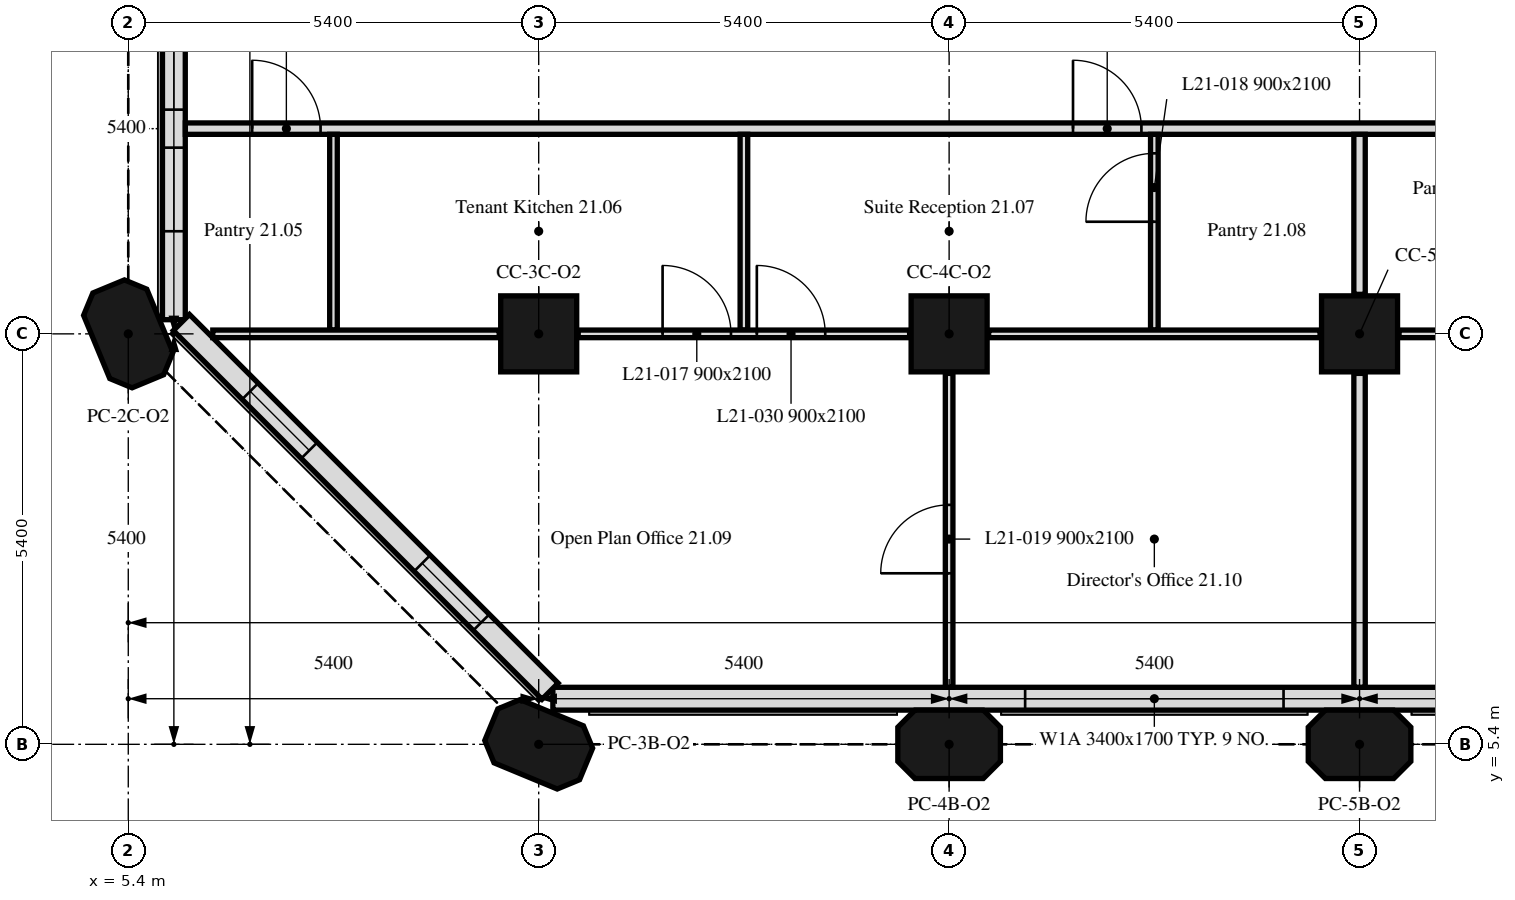
"""IFC4 building model, lengths in metres.
Left out: names, types, materials, properties, quantities, classifications, styles, units other than length and angle.
Written with IfcOpenShell. Run it as: python <this file> out.ifc"""

import sys

from ifc_helpers import new_model, si_unit, direction, frame, frame_2d, origin, origin_2d, place, context, subcontext, project, spatial, polyline, rectangle, outline, extrude, element, fill, save


model = new_model("IFC4")
c1 = context("Model", 3, precision=1e-05, world=origin(), true_north=direction((0.0, 1.0)))
c2 = subcontext(c1, "Body", "Model", "MODEL_VIEW")
j1 = project(units=[si_unit("LENGTHUNIT", "METRE"), si_unit("PLANEANGLEUNIT", "RADIAN")], contexts=[c1])
p1 = place(None, origin())
s1 = spatial("IfcSite", under=j1, at=p1, CompositionType="ELEMENT")
p2 = place(p1, origin())
s2 = spatial("IfcBuilding", under=s1, at=p2, CompositionType="ELEMENT")
p3 = place(p2, frame((0.0, 0.0, 91.6)))
s3 = spatial("IfcBuildingStorey", under=s2, at=p3, CompositionType="ELEMENT", Elevation=91.6)
for number, where, z_axis, x_axis in (
    (1, (10.8, 5.4, 0.0), (0.0, 0.0, 1.0), (-0.924, 0.383, 0.0)),
    (2, (16.2, 5.4, 0.0), (0.0, 0.0, 1.0), (1.0, 0.0, 0.0)),
    (3, (21.6, 5.4, 0.0), (0.0, 0.0, 1.0), (1.0, 0.0, 0.0)),
    (4, (5.4, 10.8, 0.0), (0.0, 0.0, 1.0), (-0.383, 0.924, 0.0)),
):
    element("IfcColumn", number, at=place(p3, frame(where, z_axis=z_axis, x_axis=x_axis)), inside=s3, PredefinedType="COLUMN", context=c2, shape_type="SweptSolid", body=[
        extrude(outline(polyline([(-0.45, -0.45), (0.45, -0.45), (0.675, -0.225), (0.675, 0.225), (0.45, 0.45), (-0.45, 0.45), (-0.675, 0.225), (-0.675, -0.225), (-0.45, -0.45)])), origin(), (0.0, 0.0, 1.0), 3.5),
    ])
for number, where, z_axis, x_axis in (
    (5, (10.8, 10.8, 0.0), (0.0, 0.0, 1.0), (1.0, 0.0, 0.0)),
    (6, (16.2, 10.8, 0.0), (0.0, 0.0, 1.0), (1.0, 0.0, 0.0)),
    (7, (21.6, 10.8, 0.0), (0.0, 0.0, 1.0), (1.0, 0.0, 0.0)),
):
    element("IfcColumn", number, at=place(p3, frame(where, z_axis=z_axis, x_axis=x_axis)), inside=s3, PredefinedType="COLUMN", context=c2, shape_type="SweptSolid", body=[
        extrude(rectangle(XDim=1.0, YDim=1.0, at=origin_2d()), origin(), (0.0, 0.0, 1.0), 3.5),
    ])
p4 = place(p3, frame((10.986, 6.0, 0.0), z_axis=(0.0, 0.0, 1.0), x_axis=(1.0, 0.0, 0.0)))
e8 = element("IfcWall", 8, at=p4, inside=s3, PredefinedType="SOLIDWALL", context=c2, shape_type="SweptSolid", body=[
    extrude(rectangle(XDim=32.027, YDim=0.3, at=frame_2d((16.014, 0.0))), origin(), (0.0, 0.0, 1.0), 3.5),
])
p5 = place(p4, frame((6.214, 0.0, 0.9)))
e9 = element("IfcOpeningElement", 9, at=p5, cuts=e8, PredefinedType="OPENING", context=c2, shape_type="SweptSolid", body=[
    extrude(rectangle(XDim=3.4, YDim=1.7, at=frame_2d((1.7, 0.85))), frame((0.0, 0.16, 0.0), z_axis=(0.0, -1.0, 0.0), x_axis=(1.0, 0.0, 0.0)), (0.0, 0.0, 1.0), 0.32),
])
p6 = place(p4, frame((17.014, 0.0, 0.9)))
e10 = element("IfcOpeningElement", 10, at=p6, cuts=e8, PredefinedType="OPENING", context=c2, shape_type="SweptSolid", body=[
    extrude(rectangle(XDim=3.4, YDim=1.7, at=frame_2d((1.7, 0.85))), frame((0.0, 0.16, 0.0), z_axis=(0.0, -1.0, 0.0), x_axis=(1.0, 0.0, 0.0)), (0.0, 0.0, 1.0), 0.32),
])
p7 = place(p4, frame((27.814, 0.0, 0.9)))
e11 = element("IfcOpeningElement", 11, at=p7, cuts=e8, PredefinedType="OPENING", context=c2, shape_type="SweptSolid", body=[
    extrude(rectangle(XDim=3.4, YDim=1.7, at=frame_2d((1.7, 0.85))), frame((0.0, 0.16, 0.0), z_axis=(0.0, -1.0, 0.0), x_axis=(1.0, 0.0, 0.0)), (0.0, 0.0, 1.0), 0.32),
])
p8 = place(p3, frame((6.0, 16.2, 0.0), z_axis=(0.0, 0.0, 1.0), x_axis=(0.0, -1.0, 0.0)))
e12 = element("IfcWall", 12, at=p8, inside=s3, PredefinedType="SOLIDWALL", context=c2, shape_type="SweptSolid", body=[
    extrude(rectangle(XDim=5.214, YDim=0.3, at=frame_2d((2.607, 0.0))), origin(), (0.0, 0.0, 1.0), 3.5),
])
p9 = place(p8, frame((1.35, 0.0, 0.9)))
e13 = element("IfcOpeningElement", 13, at=p9, cuts=e12, PredefinedType="OPENING", context=c2, shape_type="SweptSolid", body=[
    extrude(rectangle(XDim=1.1, YDim=1.7, at=frame_2d((0.55, 0.85))), frame((0.0, 0.16, 0.0), z_axis=(0.0, -1.0, 0.0), x_axis=(1.0, 0.0, 0.0)), (0.0, 0.0, 1.0), 0.32),
])
p10 = place(p8, frame((2.95, 0.0, 0.9)))
e14 = element("IfcOpeningElement", 14, at=p10, cuts=e12, PredefinedType="OPENING", context=c2, shape_type="SweptSolid", body=[
    extrude(rectangle(XDim=1.1, YDim=1.7, at=frame_2d((0.55, 0.85))), frame((0.0, 0.16, 0.0), z_axis=(0.0, -1.0, 0.0), x_axis=(1.0, 0.0, 0.0)), (0.0, 0.0, 1.0), 0.32),
])
p11 = place(p3, frame((6.099, 10.949, 0.0), z_axis=(0.0, 0.0, 1.0), x_axis=(0.707106781187, -0.707106781187, 0.0)))
e15 = element("IfcWall", 15, at=p11, inside=s3, PredefinedType="SOLIDWALL", context=c2, shape_type="SweptSolid", body=[
    extrude(rectangle(XDim=6.86, YDim=0.3, at=frame_2d((3.43, 0.0))), origin(), (0.0, 0.0, 1.0), 3.5),
])
p12 = place(p11, frame((1.28, 0.0, 0.9)))
e16 = element("IfcOpeningElement", 16, at=p12, cuts=e15, PredefinedType="OPENING", context=c2, shape_type="SweptSolid", body=[
    extrude(rectangle(XDim=1.1, YDim=1.7, at=frame_2d((0.55, 0.85))), frame((0.0, 0.16, 0.0), z_axis=(0.0, -1.0, 0.0), x_axis=(1.0, 0.0, 0.0)), (0.0, 0.0, 1.0), 0.32),
])
p13 = place(p11, frame((4.48, 0.0, 0.9)))
e17 = element("IfcOpeningElement", 17, at=p13, cuts=e15, PredefinedType="OPENING", context=c2, shape_type="SweptSolid", body=[
    extrude(rectangle(XDim=1.1, YDim=1.7, at=frame_2d((0.55, 0.85))), frame((0.0, 0.16, 0.0), z_axis=(0.0, -1.0, 0.0), x_axis=(1.0, 0.0, 0.0)), (0.0, 0.0, 1.0), 0.32),
])
p14 = place(p3, frame((6.151, 13.5, 0.0), z_axis=(0.0, 0.0, 1.0), x_axis=(1.0, 0.0, 0.0)))
e18 = element("IfcWall", 18, at=p14, inside=s3, PredefinedType="PARTITIONING", context=c2, shape_type="SweptSolid", body=[
    extrude(rectangle(XDim=41.698, YDim=0.15, at=frame_2d((20.849, 0.0))), origin(), (0.0, 0.0, 1.0), 3.5),
])
p15 = place(p14, frame((0.879, 0.0, 0.0)))
e19 = element("IfcOpeningElement", 19, at=p15, cuts=e18, PredefinedType="OPENING", context=c2, shape_type="SweptSolid", body=[
    extrude(rectangle(XDim=0.9, YDim=2.1, at=frame_2d((0.45, 1.05))), frame((0.0, 0.075, 0.0), z_axis=(0.0, -1.0, 0.0), x_axis=(1.0, 0.0, 0.0)), (0.0, 0.0, 1.0), 0.15),
])
p16 = place(p14, frame((17.079, 0.0, 0.0)))
e20 = element("IfcOpeningElement", 20, at=p16, cuts=e18, PredefinedType="OPENING", context=c2, shape_type="SweptSolid", body=[
    extrude(rectangle(XDim=0.9, YDim=2.1, at=frame_2d((0.45, 1.05))), frame((0.0, 0.075, 0.0), z_axis=(0.0, -1.0, 0.0), x_axis=(1.0, 0.0, 0.0)), (0.0, 0.0, 1.0), 0.15),
])
p17 = place(p14, frame((33.279, 0.0, 0.0)))
e21 = element("IfcOpeningElement", 21, at=p17, cuts=e18, PredefinedType="OPENING", context=c2, shape_type="SweptSolid", body=[
    extrude(rectangle(XDim=0.9, YDim=2.1, at=frame_2d((0.45, 1.05))), frame((0.0, 0.075, 0.0), z_axis=(0.0, -1.0, 0.0), x_axis=(1.0, 0.0, 0.0)), (0.0, 0.0, 1.0), 0.15),
])
p18 = place(p14, frame((11.679, 0.0, 0.0)))
e22 = element("IfcOpeningElement", 22, at=p18, cuts=e18, PredefinedType="OPENING", context=c2, shape_type="SweptSolid", body=[
    extrude(rectangle(XDim=0.9, YDim=2.1, at=frame_2d((0.45, 1.05))), frame((0.0, 0.075, 0.0), z_axis=(0.0, -1.0, 0.0), x_axis=(1.0, 0.0, 0.0)), (0.0, 0.0, 1.0), 0.15),
])
p19 = place(p14, frame((34.519, 0.0, 0.0)))
e23 = element("IfcOpeningElement", 23, at=p19, cuts=e18, PredefinedType="OPENING", context=c2, shape_type="SweptSolid", body=[
    extrude(rectangle(XDim=0.9, YDim=2.1, at=frame_2d((0.45, 1.05))), frame((0.0, 0.075, 0.0), z_axis=(0.0, -1.0, 0.0), x_axis=(1.0, 0.0, 0.0)), (0.0, 0.0, 1.0), 0.15),
])
p20 = place(p3, frame((8.1, 10.85, 0.0), z_axis=(0.0, 0.0, 1.0), x_axis=(0.0, 1.0, 0.0)))
e24 = element("IfcWall", 24, at=p20, inside=s3, PredefinedType="PARTITIONING", context=c2, shape_type="SweptSolid", body=[
    extrude(rectangle(XDim=2.575, YDim=0.1, at=frame_2d((1.288, 0.0))), origin(), (0.0, 0.0, 1.0), 3.5),
])
p21 = place(p3, frame((6.512, 10.8, 0.0), z_axis=(0.0, 0.0, 1.0), x_axis=(1.0, 0.0, 0.0)))
e25 = element("IfcWall", 25, at=p21, inside=s3, PredefinedType="PARTITIONING", context=c2, shape_type="SweptSolid", body=[
    extrude(rectangle(XDim=3.768, YDim=0.1, at=frame_2d((1.884, 0.0))), origin(), (0.0, 0.0, 1.0), 3.5),
])
p22 = place(p3, frame((13.5, 10.85, 0.0), z_axis=(0.0, 0.0, 1.0), x_axis=(0.0, 1.0, 0.0)))
e26 = element("IfcWall", 26, at=p22, inside=s3, PredefinedType="PARTITIONING", context=c2, shape_type="SweptSolid", body=[
    extrude(rectangle(XDim=2.575, YDim=0.1, at=frame_2d((1.288, 0.0))), origin(), (0.0, 0.0, 1.0), 3.5),
])
p23 = place(p3, frame((11.32, 10.8, 0.0), z_axis=(0.0, 0.0, 1.0), x_axis=(1.0, 0.0, 0.0)))
e27 = element("IfcWall", 27, at=p23, inside=s3, PredefinedType="PARTITIONING", context=c2, shape_type="SweptSolid", body=[
    extrude(rectangle(XDim=4.36, YDim=0.1, at=frame_2d((2.18, 0.0))), origin(), (0.0, 0.0, 1.0), 3.5),
])
p24 = place(p23, frame((1.11, 0.0, 0.0)))
e28 = element("IfcOpeningElement", 28, at=p24, cuts=e27, PredefinedType="OPENING", context=c2, shape_type="SweptSolid", body=[
    extrude(rectangle(XDim=0.9, YDim=2.1, at=frame_2d((0.45, 1.05))), frame((0.0, 0.05, 0.0), z_axis=(0.0, -1.0, 0.0), x_axis=(1.0, 0.0, 0.0)), (0.0, 0.0, 1.0), 0.1),
])
p25 = place(p23, frame((2.35, 0.0, 0.0)))
e29 = element("IfcOpeningElement", 29, at=p25, cuts=e27, PredefinedType="OPENING", context=c2, shape_type="SweptSolid", body=[
    extrude(rectangle(XDim=0.9, YDim=2.1, at=frame_2d((0.45, 1.05))), frame((0.0, 0.05, 0.0), z_axis=(0.0, -1.0, 0.0), x_axis=(1.0, 0.0, 0.0)), (0.0, 0.0, 1.0), 0.1),
])
p26 = place(p3, frame((18.9, 10.85, 0.0), z_axis=(0.0, 0.0, 1.0), x_axis=(0.0, 1.0, 0.0)))
e30 = element("IfcWall", 30, at=p26, inside=s3, PredefinedType="PARTITIONING", context=c2, shape_type="SweptSolid", body=[
    extrude(rectangle(XDim=2.575, YDim=0.1, at=frame_2d((1.288, 0.0))), origin(), (0.0, 0.0, 1.0), 3.5),
])
p27 = place(p26, frame((1.425, 0.0, 0.0)))
e31 = element("IfcOpeningElement", 31, at=p27, cuts=e30, PredefinedType="OPENING", context=c2, shape_type="SweptSolid", body=[
    extrude(rectangle(XDim=0.9, YDim=2.1, at=frame_2d((0.45, 1.05))), frame((0.0, 0.05, 0.0), z_axis=(0.0, -1.0, 0.0), x_axis=(1.0, 0.0, 0.0)), (0.0, 0.0, 1.0), 0.1),
])
p28 = place(p3, frame((16.72, 10.8, 0.0), z_axis=(0.0, 0.0, 1.0), x_axis=(1.0, 0.0, 0.0)))
e32 = element("IfcWall", 32, at=p28, inside=s3, PredefinedType="PARTITIONING", context=c2, shape_type="SweptSolid", body=[
    extrude(rectangle(XDim=4.36, YDim=0.1, at=frame_2d((2.18, 0.0))), origin(), (0.0, 0.0, 1.0), 3.5),
])
p29 = place(p3, frame((21.6, 11.32, 0.0), z_axis=(0.0, 0.0, 1.0), x_axis=(0.0, 1.0, 0.0)))
e33 = element("IfcWall", 33, at=p29, inside=s3, PredefinedType="PARTITIONING", context=c2, shape_type="SweptSolid", body=[
    extrude(rectangle(XDim=2.105, YDim=0.15, at=frame_2d((1.052, 0.0))), origin(), (0.0, 0.0, 1.0), 3.5),
])
p30 = place(p3, frame((16.2, 6.151, 0.0), z_axis=(0.0, 0.0, 1.0), x_axis=(0.0, 1.0, 0.0)))
e34 = element("IfcWall", 34, at=p30, inside=s3, PredefinedType="PARTITIONING", context=c2, shape_type="SweptSolid", body=[
    extrude(rectangle(XDim=4.129, YDim=0.1, at=frame_2d((2.064, 0.0))), origin(), (0.0, 0.0, 1.0), 3.5),
])
p31 = place(p30, frame((1.499, 0.0, 0.0)))
e35 = element("IfcOpeningElement", 35, at=p31, cuts=e34, PredefinedType="OPENING", context=c2, shape_type="SweptSolid", body=[
    extrude(rectangle(XDim=0.9, YDim=2.1, at=frame_2d((0.45, 1.05))), frame((0.0, 0.05, 0.0), z_axis=(0.0, -1.0, 0.0), x_axis=(1.0, 0.0, 0.0)), (0.0, 0.0, 1.0), 0.1),
])
p32 = place(p3, frame((21.6, 6.151, 0.0), z_axis=(0.0, 0.0, 1.0), x_axis=(0.0, 1.0, 0.0)))
e36 = element("IfcWall", 36, at=p32, inside=s3, PredefinedType="PARTITIONING", context=c2, shape_type="SweptSolid", body=[
    extrude(rectangle(XDim=4.129, YDim=0.15, at=frame_2d((2.064, 0.0))), origin(), (0.0, 0.0, 1.0), 3.5),
])
p33 = place(p3, frame((22.12, 10.8, 0.0), z_axis=(0.0, 0.0, 1.0), x_axis=(1.0, 0.0, 0.0)))
e37 = element("IfcWall", 37, at=p33, inside=s3, PredefinedType="PARTITIONING", context=c2, shape_type="SweptSolid", body=[
    extrude(rectangle(XDim=4.36, YDim=0.1, at=frame_2d((2.18, 0.0))), origin(), (0.0, 0.0, 1.0), 3.5),
])
p34 = place(p5, origin())
e38 = element("IfcWindow", 38, at=p34, inside=s3, PartitioningType="SINGLE_PANEL", PredefinedType="WINDOW", context=c2, shape_type="SweptSolid", body=[
    extrude(rectangle(XDim=3.4, YDim=1.7, at=frame_2d((1.7, 0.85))), frame((0.0, 0.03, 0.0), z_axis=(0.0, -1.0, 0.0), x_axis=(1.0, 0.0, 0.0)), (0.0, 0.0, 1.0), 0.06),
])
fill(e9, e38)
p35 = place(p9, origin())
e39 = element("IfcWindow", 39, at=p35, inside=s3, PartitioningType="SINGLE_PANEL", PredefinedType="WINDOW", context=c2, shape_type="SweptSolid", body=[
    extrude(rectangle(XDim=1.1, YDim=1.7, at=frame_2d((0.55, 0.85))), frame((0.0, 0.03, 0.0), z_axis=(0.0, -1.0, 0.0), x_axis=(1.0, 0.0, 0.0)), (0.0, 0.0, 1.0), 0.06),
])
fill(e13, e39)
p36 = place(p10, origin())
e40 = element("IfcWindow", 40, at=p36, inside=s3, PartitioningType="SINGLE_PANEL", PredefinedType="WINDOW", context=c2, shape_type="SweptSolid", body=[
    extrude(rectangle(XDim=1.1, YDim=1.7, at=frame_2d((0.55, 0.85))), frame((0.0, 0.03, 0.0), z_axis=(0.0, -1.0, 0.0), x_axis=(1.0, 0.0, 0.0)), (0.0, 0.0, 1.0), 0.06),
])
fill(e14, e40)
p37 = place(p12, origin())
e41 = element("IfcWindow", 41, at=p37, inside=s3, PartitioningType="SINGLE_PANEL", PredefinedType="WINDOW", context=c2, shape_type="SweptSolid", body=[
    extrude(rectangle(XDim=1.1, YDim=1.7, at=frame_2d((0.55, 0.85))), frame((0.0, 0.03, 0.0), z_axis=(0.0, -1.0, 0.0), x_axis=(1.0, 0.0, 0.0)), (0.0, 0.0, 1.0), 0.06),
])
fill(e16, e41)
p38 = place(p13, origin())
e42 = element("IfcWindow", 42, at=p38, inside=s3, PartitioningType="SINGLE_PANEL", PredefinedType="WINDOW", context=c2, shape_type="SweptSolid", body=[
    extrude(rectangle(XDim=1.1, YDim=1.7, at=frame_2d((0.55, 0.85))), frame((0.0, 0.03, 0.0), z_axis=(0.0, -1.0, 0.0), x_axis=(1.0, 0.0, 0.0)), (0.0, 0.0, 1.0), 0.06),
])
fill(e17, e42)
p39 = place(p15, origin())
e43 = element("IfcDoor", 43, at=p39, inside=s3, OperationType="SINGLE_SWING_RIGHT", PredefinedType="DOOR", context=c2, shape_type="SweptSolid", body=[
    extrude(rectangle(XDim=0.9, YDim=2.1, at=frame_2d((0.45, 1.05))), frame((0.0, 0.025, 0.0), z_axis=(0.0, -1.0, 0.0), x_axis=(1.0, 0.0, 0.0)), (0.0, 0.0, 1.0), 0.05),
])
fill(e19, e43)
p40 = place(p24, origin())
e44 = element("IfcDoor", 44, at=p40, inside=s3, OperationType="SINGLE_SWING_LEFT", PredefinedType="DOOR", context=c2, shape_type="SweptSolid", body=[
    extrude(rectangle(XDim=0.9, YDim=2.1, at=frame_2d((0.45, 1.05))), frame((0.0, 0.025, 0.0), z_axis=(0.0, -1.0, 0.0), x_axis=(1.0, 0.0, 0.0)), (0.0, 0.0, 1.0), 0.05),
])
fill(e28, e44)
p41 = place(p27, origin())
e45 = element("IfcDoor", 45, at=p41, inside=s3, OperationType="SINGLE_SWING_RIGHT", PredefinedType="DOOR", context=c2, shape_type="SweptSolid", body=[
    extrude(rectangle(XDim=0.9, YDim=2.1, at=frame_2d((0.45, 1.05))), frame((0.0, 0.025, 0.0), z_axis=(0.0, -1.0, 0.0), x_axis=(1.0, 0.0, 0.0)), (0.0, 0.0, 1.0), 0.05),
])
fill(e31, e45)
p42 = place(p31, origin())
e46 = element("IfcDoor", 46, at=p42, inside=s3, OperationType="SINGLE_SWING_RIGHT", PredefinedType="DOOR", context=c2, shape_type="SweptSolid", body=[
    extrude(rectangle(XDim=0.9, YDim=2.1, at=frame_2d((0.45, 1.05))), frame((0.0, 0.025, 0.0), z_axis=(0.0, -1.0, 0.0), x_axis=(1.0, 0.0, 0.0)), (0.0, 0.0, 1.0), 0.05),
])
fill(e35, e46)
p43 = place(p18, origin())
e47 = element("IfcDoor", 47, at=p43, inside=s3, OperationType="SINGLE_SWING_RIGHT", PredefinedType="DOOR", context=c2, shape_type="SweptSolid", body=[
    extrude(rectangle(XDim=0.9, YDim=2.1, at=frame_2d((0.45, 1.05))), frame((0.0, 0.025, 0.0), z_axis=(0.0, -1.0, 0.0), x_axis=(1.0, 0.0, 0.0)), (0.0, 0.0, 1.0), 0.05),
])
fill(e22, e47)
p44 = place(p25, origin())
e48 = element("IfcDoor", 48, at=p44, inside=s3, OperationType="SINGLE_SWING_LEFT", PredefinedType="DOOR", context=c2, shape_type="SweptSolid", body=[
    extrude(rectangle(XDim=0.9, YDim=2.1, at=frame_2d((0.45, 1.05))), frame((0.0, 0.025, 0.0), z_axis=(0.0, -1.0, 0.0), x_axis=(1.0, 0.0, 0.0)), (0.0, 0.0, 1.0), 0.05),
])
fill(e29, e48)
save(model, sys.argv[1])
